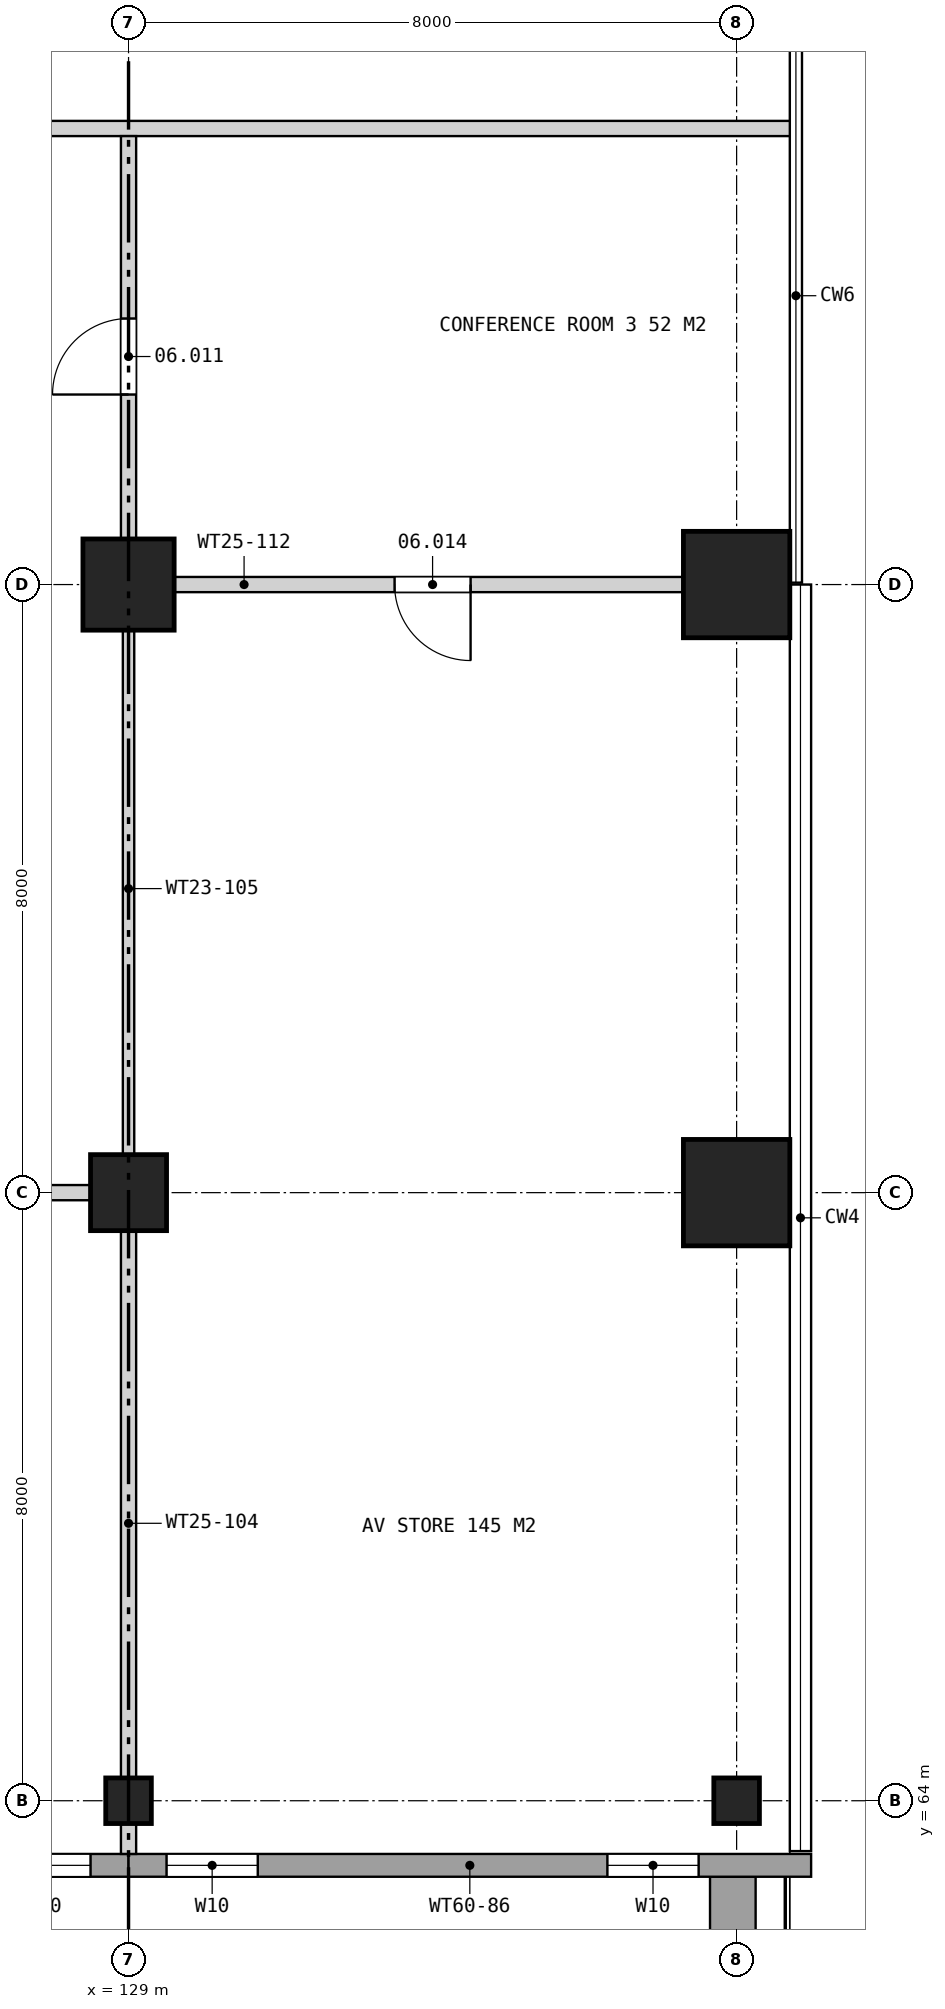
"""IFC4 building model, lengths in metres.
Left out: names, types, materials, properties, quantities, classifications, styles, units other than length and angle.
Written with IfcOpenShell. Run it as: python <this file> out.ifc"""

import sys

from ifc_helpers import new_model, si_unit, direction, frame, frame_2d, origin, origin_2d, place, context, subcontext, project, spatial, rectangle, extrude, element, fill, save


model = new_model("IFC4")
c1 = context("Model", 3, precision=1e-05, world=origin(), true_north=direction((0.0, 1.0)))
c2 = subcontext(c1, "Body", "Model", "MODEL_VIEW")
j1 = project(units=[si_unit("LENGTHUNIT", "METRE"), si_unit("PLANEANGLEUNIT", "RADIAN")], contexts=[c1])
p1 = place(None, origin())
s1 = spatial("IfcSite", under=j1, at=p1, CompositionType="ELEMENT")
p2 = place(p1, origin())
s2 = spatial("IfcBuilding", under=s1, at=p2, CompositionType="ELEMENT")
p3 = place(p2, frame((0.0, 0.0, 47.5)))
s3 = spatial("IfcBuildingStorey", under=s2, at=p3, CompositionType="ELEMENT", Elevation=47.5)
p4 = place(p3, frame((137.0, 64.0, 0.0), z_axis=(0.0, 0.0, 1.0), x_axis=(1.0, 0.0, 0.0)))
e1 = element("IfcColumn", 1, at=p4, inside=s3, PredefinedType="COLUMN", context=c2, shape_type="SweptSolid", body=[
    extrude(rectangle(XDim=0.6, YDim=0.6, at=origin_2d()), origin(), (0.0, 0.0, 1.0), 6.0),
])
for number, where, z_axis, x_axis in (
    (2, (137.0, 72.0, 0.0), (0.0, 0.0, 1.0), (1.0, 0.0, 0.0)),
    (3, (137.0, 80.0, 0.0), (0.0, 0.0, 1.0), (1.0, 0.0, 0.0)),
):
    element("IfcColumn", number, at=place(p3, frame(where, z_axis=z_axis, x_axis=x_axis)), inside=s3, PredefinedType="COLUMN", context=c2, shape_type="SweptSolid", body=[
        extrude(rectangle(XDim=1.4, YDim=1.4, at=origin_2d()), origin(), (0.0, 0.0, 1.0), 6.0),
    ])
p5 = place(p3, frame((129.0, 64.0, 5.2), z_axis=(0.0, 0.0, 1.0), x_axis=(1.0, 0.0, 0.0)))
e4 = element("IfcColumn", 4, at=p5, inside=s3, PredefinedType="COLUMN", context=c2, shape_type="SweptSolid", body=[
    extrude(rectangle(XDim=0.6, YDim=0.6, at=origin_2d()), origin(), (0.0, 0.0, 1.0), 0.8),
])
p6 = place(p3, frame((129.0, 72.0, 5.2), z_axis=(0.0, 0.0, 1.0), x_axis=(1.0, 0.0, 0.0)))
e5 = element("IfcColumn", 5, at=p6, inside=s3, PredefinedType="COLUMN", context=c2, shape_type="SweptSolid", body=[
    extrude(rectangle(XDim=1.0, YDim=1.0, at=origin_2d()), origin(), (0.0, 0.0, 1.0), 0.8),
])
p7 = place(p3, frame((129.0, 80.0, 5.2), z_axis=(0.0, 0.0, 1.0), x_axis=(1.0, 0.0, 0.0)))
e6 = element("IfcColumn", 6, at=p7, inside=s3, PredefinedType="COLUMN", context=c2, shape_type="SweptSolid", body=[
    extrude(rectangle(XDim=1.2, YDim=1.2, at=origin_2d()), origin(), (0.0, 0.0, 1.0), 0.8),
])
p8 = place(p3, frame((136.95, 63.0, 0.0), z_axis=(0.0, 0.0, 1.0), x_axis=(0.0, -1.0, 0.0)))
e7 = element("IfcWall", 7, at=p8, inside=s3, PredefinedType="SOLIDWALL", context=c2, shape_type="SweptSolid", body=[
    extrude(rectangle(XDim=7.25, YDim=0.6, at=frame_2d((3.625, 0.0))), origin(), (0.0, 0.0, 1.0), 0.6),
])
p9 = place(p3, frame((121.0, 63.15, 0.0), z_axis=(0.0, 0.0, 1.0), x_axis=(1.0, 0.0, 0.0)))
e8 = element("IfcWall", 8, at=p9, inside=s3, PredefinedType="SOLIDWALL", context=c2, shape_type="SweptSolid", body=[
    extrude(rectangle(XDim=8.0, YDim=0.3, at=frame_2d((4.0, 0.0))), origin(), (0.0, 0.0, 1.0), 5.26),
])
p10 = place(p9, frame((2.8, 0.0, 0.0)))
e9 = element("IfcOpeningElement", 9, at=p10, cuts=e8, PredefinedType="OPENING", context=c2, shape_type="SweptSolid", body=[
    extrude(rectangle(XDim=2.4, YDim=2.4, at=frame_2d((1.2, 1.2))), frame((0.0, 0.16, 0.0), z_axis=(0.0, -1.0, 0.0), x_axis=(1.0, 0.0, 0.0)), (0.0, 0.0, 1.0), 0.32),
])
p11 = place(p9, frame((0.5, 0.0, 0.4)))
e10 = element("IfcOpeningElement", 10, at=p11, cuts=e8, PredefinedType="OPENING", context=c2, shape_type="SweptSolid", body=[
    extrude(rectangle(XDim=1.2, YDim=2.2, at=frame_2d((0.6, 1.1))), frame((0.0, 0.16, 0.0), z_axis=(0.0, -1.0, 0.0), x_axis=(1.0, 0.0, 0.0)), (0.0, 0.0, 1.0), 0.32),
])
p12 = place(p9, frame((6.3, 0.0, 0.4)))
e11 = element("IfcOpeningElement", 11, at=p12, cuts=e8, PredefinedType="OPENING", context=c2, shape_type="SweptSolid", body=[
    extrude(rectangle(XDim=1.2, YDim=2.2, at=frame_2d((0.6, 1.1))), frame((0.0, 0.16, 0.0), z_axis=(0.0, -1.0, 0.0), x_axis=(1.0, 0.0, 0.0)), (0.0, 0.0, 1.0), 0.32),
])
p13 = place(p3, frame((129.0, 63.15, 0.0), z_axis=(0.0, 0.0, 1.0), x_axis=(1.0, 0.0, 0.0)))
e12 = element("IfcWall", 12, at=p13, inside=s3, PredefinedType="SOLIDWALL", context=c2, shape_type="SweptSolid", body=[
    extrude(rectangle(XDim=8.98, YDim=0.3, at=frame_2d((4.49, 0.0))), origin(), (0.0, 0.0, 1.0), 5.26),
])
p14 = place(p13, frame((0.5, 0.0, 0.4)))
e13 = element("IfcOpeningElement", 13, at=p14, cuts=e12, PredefinedType="OPENING", context=c2, shape_type="SweptSolid", body=[
    extrude(rectangle(XDim=1.2, YDim=2.2, at=frame_2d((0.6, 1.1))), frame((0.0, 0.16, 0.0), z_axis=(0.0, -1.0, 0.0), x_axis=(1.0, 0.0, 0.0)), (0.0, 0.0, 1.0), 0.32),
])
p15 = place(p13, frame((6.3, 0.0, 0.4)))
e14 = element("IfcOpeningElement", 14, at=p15, cuts=e12, PredefinedType="OPENING", context=c2, shape_type="SweptSolid", body=[
    extrude(rectangle(XDim=1.2, YDim=2.2, at=frame_2d((0.6, 1.1))), frame((0.0, 0.16, 0.0), z_axis=(0.0, -1.0, 0.0), x_axis=(1.0, 0.0, 0.0)), (0.0, 0.0, 1.0), 0.32),
])
p16 = place(p3, frame((121.075, 72.0, 0.0), z_axis=(0.0, 0.0, 1.0), x_axis=(1.0, 0.0, 0.0)))
e15 = element("IfcWall", 15, at=p16, inside=s3, PredefinedType="PARTITIONING", context=c2, shape_type="SweptSolid", body=[
    extrude(rectangle(XDim=7.85, YDim=0.2, at=frame_2d((3.925, 0.0))), origin(), (0.0, 0.0, 1.0), 2.7),
])
p17 = place(p16, frame((3.425, 0.0, 0.0)))
e16 = element("IfcOpeningElement", 16, at=p17, cuts=e15, PredefinedType="OPENING", context=c2, shape_type="SweptSolid", body=[
    extrude(rectangle(XDim=1.0, YDim=2.1, at=frame_2d((0.5, 1.05))), frame((0.0, 0.11, 0.0), z_axis=(0.0, -1.0, 0.0), x_axis=(1.0, 0.0, 0.0)), (0.0, 0.0, 1.0), 0.22),
])
p18 = place(p3, frame((129.075, 80.0, 0.0), z_axis=(0.0, 0.0, 1.0), x_axis=(1.0, 0.0, 0.0)))
e17 = element("IfcWall", 17, at=p18, inside=s3, PredefinedType="PARTITIONING", context=c2, shape_type="SweptSolid", body=[
    extrude(rectangle(XDim=7.225, YDim=0.2, at=frame_2d((3.613, 0.0))), origin(), (0.0, 0.0, 1.0), 2.7),
])
p19 = place(p18, frame((3.425, 0.0, 0.0)))
e18 = element("IfcOpeningElement", 18, at=p19, cuts=e17, PredefinedType="OPENING", context=c2, shape_type="SweptSolid", body=[
    extrude(rectangle(XDim=1.0, YDim=2.1, at=frame_2d((0.5, 1.05))), frame((0.0, 0.11, 0.0), z_axis=(0.0, -1.0, 0.0), x_axis=(1.0, 0.0, 0.0)), (0.0, 0.0, 1.0), 0.22),
])
p20 = place(p3, frame((112.2, 86.0, 0.0), z_axis=(0.0, 0.0, 1.0), x_axis=(1.0, 0.0, 0.0)))
e19 = element("IfcWall", 19, at=p20, inside=s3, PredefinedType="PARTITIONING", context=c2, shape_type="SweptSolid", body=[
    extrude(rectangle(XDim=25.6, YDim=0.2, at=frame_2d((12.8, 0.0))), origin(), (0.0, 0.0, 1.0), 5.26),
])
p21 = place(p20, frame((11.9, 0.0, 0.0)))
e20 = element("IfcOpeningElement", 20, at=p21, cuts=e19, PredefinedType="OPENING", context=c2, shape_type="SweptSolid", body=[
    extrude(rectangle(XDim=1.8, YDim=2.4, at=frame_2d((0.9, 1.2))), frame((0.0, 0.11, 0.0), z_axis=(0.0, -1.0, 0.0), x_axis=(1.0, 0.0, 0.0)), (0.0, 0.0, 1.0), 0.22),
])
p22 = place(p3, frame((129.0, 63.3, 0.0), z_axis=(0.0, 0.0, 1.0), x_axis=(0.0, 1.0, 0.0)))
e21 = element("IfcWall", 21, at=p22, inside=s3, PredefinedType="PARTITIONING", context=c2, shape_type="SweptSolid", body=[
    extrude(rectangle(XDim=8.7, YDim=0.2, at=frame_2d((4.35, 0.0))), origin(), (0.0, 0.0, 1.0), 2.7),
])
p23 = place(p3, frame((129.0, 72.0, 0.0), z_axis=(0.0, 0.0, 1.0), x_axis=(0.0, 1.0, 0.0)))
e22 = element("IfcWall", 22, at=p23, inside=s3, PredefinedType="PARTITIONING", context=c2, shape_type="SweptSolid", body=[
    extrude(rectangle(XDim=8.0, YDim=0.15, at=frame_2d((4.0, 0.0))), origin(), (0.0, 0.0, 1.0), 2.7),
])
p24 = place(p3, frame((129.0, 80.0, 0.0), z_axis=(0.0, 0.0, 1.0), x_axis=(0.0, 1.0, 0.0)))
e23 = element("IfcWall", 23, at=p24, inside=s3, PredefinedType="PARTITIONING", context=c2, shape_type="SweptSolid", body=[
    extrude(rectangle(XDim=5.9, YDim=0.2, at=frame_2d((2.95, 0.0))), origin(), (0.0, 0.0, 1.0), 2.7),
])
p25 = place(p24, frame((2.5, 0.0, 0.0)))
e24 = element("IfcOpeningElement", 24, at=p25, cuts=e23, PredefinedType="OPENING", context=c2, shape_type="SweptSolid", body=[
    extrude(rectangle(XDim=1.0, YDim=2.1, at=frame_2d((0.5, 1.05))), frame((0.0, 0.11, 0.0), z_axis=(0.0, -1.0, 0.0), x_axis=(1.0, 0.0, 0.0)), (0.0, 0.0, 1.0), 0.22),
])
p26 = place(p12, origin())
e25 = element("IfcWindow", 25, at=p26, inside=s3, PartitioningType="SINGLE_PANEL", PredefinedType="WINDOW", context=c2, shape_type="SweptSolid", body=[
    extrude(rectangle(XDim=1.2, YDim=2.2, at=frame_2d((0.6, 1.1))), frame((0.0, 0.03, 0.0), z_axis=(0.0, -1.0, 0.0), x_axis=(1.0, 0.0, 0.0)), (0.0, 0.0, 1.0), 0.06),
])
fill(e11, e25)
p27 = place(p14, origin())
e26 = element("IfcWindow", 26, at=p27, inside=s3, PartitioningType="SINGLE_PANEL", PredefinedType="WINDOW", context=c2, shape_type="SweptSolid", body=[
    extrude(rectangle(XDim=1.2, YDim=2.2, at=frame_2d((0.6, 1.1))), frame((0.0, 0.03, 0.0), z_axis=(0.0, -1.0, 0.0), x_axis=(1.0, 0.0, 0.0)), (0.0, 0.0, 1.0), 0.06),
])
fill(e13, e26)
p28 = place(p15, origin())
e27 = element("IfcWindow", 27, at=p28, inside=s3, PartitioningType="SINGLE_PANEL", PredefinedType="WINDOW", context=c2, shape_type="SweptSolid", body=[
    extrude(rectangle(XDim=1.2, YDim=2.2, at=frame_2d((0.6, 1.1))), frame((0.0, 0.03, 0.0), z_axis=(0.0, -1.0, 0.0), x_axis=(1.0, 0.0, 0.0)), (0.0, 0.0, 1.0), 0.06),
])
fill(e14, e27)
p29 = place(p25, origin())
e28 = element("IfcDoor", 28, at=p29, inside=s3, OperationType="SINGLE_SWING_LEFT", PredefinedType="DOOR", context=c2, shape_type="SweptSolid", body=[
    extrude(rectangle(XDim=1.0, YDim=2.1, at=frame_2d((0.5, 1.05))), frame((0.0, 0.025, 0.0), z_axis=(0.0, -1.0, 0.0), x_axis=(1.0, 0.0, 0.0)), (0.0, 0.0, 1.0), 0.05),
])
fill(e24, e28)
p30 = place(p19, frame((1.0, 0.0, 0.0), z_axis=(0.0, 0.0, 1.0), x_axis=(-1.0, 0.0, 0.0)))
e29 = element("IfcDoor", 29, at=p30, inside=s3, OperationType="SINGLE_SWING_LEFT", PredefinedType="DOOR", context=c2, shape_type="SweptSolid", body=[
    extrude(rectangle(XDim=1.0, YDim=2.1, at=frame_2d((0.5, 1.05))), frame((0.0, 0.025, 0.0), z_axis=(0.0, -1.0, 0.0), x_axis=(1.0, 0.0, 0.0)), (0.0, 0.0, 1.0), 0.05),
])
fill(e18, e29)
save(model, sys.argv[1])
